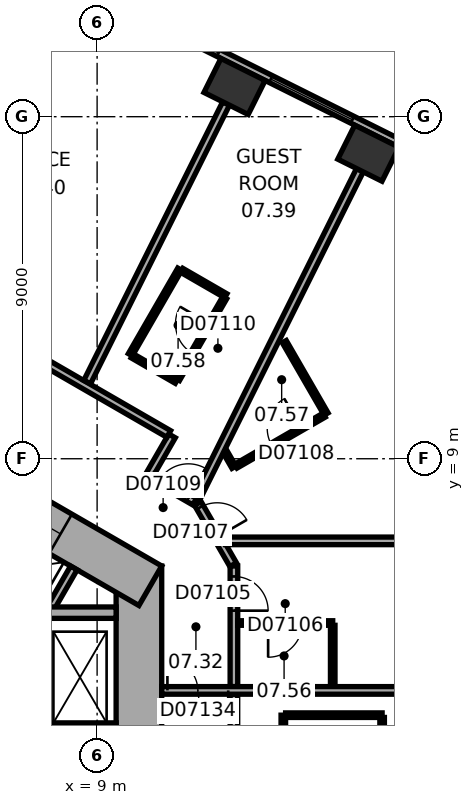
"""IFC4 building model, lengths in metres.
Left out: names, types, materials, properties, quantities, classifications, styles, units other than length and angle.
Written with IfcOpenShell. Run it as: python <this file> out.ifc"""

import sys

from ifc_helpers import new_model, si_unit, direction, frame, frame_2d, origin, origin_2d, place, context, subcontext, project, spatial, rectangle, extrude, element, fill, save


model = new_model("IFC4")
c1 = context("Model", 3, precision=1e-05, world=origin(), true_north=direction((0.0, 1.0)))
c2 = subcontext(c1, "Body", "Model", "MODEL_VIEW")
j1 = project(units=[si_unit("LENGTHUNIT", "METRE"), si_unit("PLANEANGLEUNIT", "RADIAN")], contexts=[c1])
p1 = place(None, origin())
s1 = spatial("IfcSite", under=j1, at=p1, CompositionType="ELEMENT")
p2 = place(p1, origin())
s2 = spatial("IfcBuilding", under=s1, at=p2, CompositionType="ELEMENT")
p3 = place(p2, frame((0.0, 0.0, 44.0)))
s3 = spatial("IfcBuildingStorey", under=s2, at=p3, CompositionType="ELEMENT", Elevation=44.0)
for number, where, z_axis, x_axis in (
    (1, (16.138, 17.04, 0.0), (0.0, 0.0, 1.0), (-0.895, 0.446, 0.0)),
    (2, (12.616, 18.795, 0.0), (0.0, 0.0, 1.0), (-0.895, 0.446, 0.0)),
):
    element("IfcColumn", number, at=place(p3, frame(where, z_axis=z_axis, x_axis=x_axis)), inside=s3, PredefinedType="COLUMN", context=c2, shape_type="SweptSolid", body=[
        extrude(rectangle(XDim=1.3, YDim=1.0, at=origin_2d()), origin(), (0.0, 0.0, 1.0), 3.3),
    ])
p4 = place(p3, frame((10.1, -6.177, 0.0), z_axis=(0.0, 0.0, 1.0), x_axis=(0.0, 1.0, 0.0)))
e3 = element("IfcWall", 3, at=p4, inside=s3, PredefinedType="SHEAR", context=c2, shape_type="SweptSolid", body=[
    extrude(rectangle(XDim=12.355, YDim=1.2, at=frame_2d((6.177, 0.0))), origin(), (0.0, 0.0, 1.0), 3.3),
])
p5 = place(p4, frame((6.378, 0.0, 0.0)))
e4 = element("IfcOpeningElement", 4, at=p5, cuts=e3, PredefinedType="OPENING", context=c2, shape_type="SweptSolid", body=[
    extrude(rectangle(XDim=1.5, YDim=2.1, at=frame_2d((0.75, 1.05))), frame((0.0, 0.61, 0.0), z_axis=(0.0, -1.0, 0.0), x_axis=(1.0, 0.0, 0.0)), (0.0, 0.0, 1.0), 1.22),
])
p6 = place(p4, frame((1.828, 0.0, 0.0)))
e5 = element("IfcOpeningElement", 5, at=p6, cuts=e3, PredefinedType="OPENING", context=c2, shape_type="SweptSolid", body=[
    extrude(rectangle(XDim=1.1, YDim=2.1, at=frame_2d((0.55, 1.05))), frame((0.0, 0.61, 0.0), z_axis=(0.0, -1.0, 0.0), x_axis=(1.0, 0.0, 0.0)), (0.0, 0.0, 1.0), 1.22),
])
p7 = place(p4, frame((4.427, 0.0, 0.0)))
e6 = element("IfcOpeningElement", 6, at=p7, cuts=e3, PredefinedType="OPENING", context=c2, shape_type="SweptSolid", body=[
    extrude(rectangle(XDim=1.1, YDim=2.1, at=frame_2d((0.55, 1.05))), frame((0.0, 0.61, 0.0), z_axis=(0.0, -1.0, 0.0), x_axis=(1.0, 0.0, 0.0)), (0.0, 0.0, 1.0), 1.22),
])
p8 = place(p3, frame((10.4, 5.658, 0.0), z_axis=(0.0, 0.0, 1.0), x_axis=(-0.866021384402, 0.500006961711, 0.0)))
e7 = element("IfcWall", 7, at=p8, inside=s3, PredefinedType="SHEAR", context=c2, shape_type="SweptSolid", body=[
    extrude(rectangle(XDim=12.355, YDim=1.2, at=frame_2d((6.178, 0.0))), origin(), (0.0, 0.0, 1.0), 3.3),
])
p9 = place(p8, frame((2.728, 0.0, 0.0)))
e8 = element("IfcOpeningElement", 8, at=p9, cuts=e7, PredefinedType="OPENING", context=c2, shape_type="SweptSolid", body=[
    extrude(rectangle(XDim=1.1, YDim=2.1, at=frame_2d((0.55, 1.05))), frame((0.0, 0.61, 0.0), z_axis=(0.0, -1.0, 0.0), x_axis=(1.0, 0.0, 0.0)), (0.0, 0.0, 1.0), 1.22),
])
p10 = place(p8, frame((5.328, 0.0, 0.0)))
e9 = element("IfcOpeningElement", 9, at=p10, cuts=e7, PredefinedType="OPENING", context=c2, shape_type="SweptSolid", body=[
    extrude(rectangle(XDim=1.1, YDim=2.1, at=frame_2d((0.55, 1.05))), frame((0.0, 0.61, 0.0), z_axis=(0.0, -1.0, 0.0), x_axis=(1.0, 0.0, 0.0)), (0.0, 0.0, 1.0), 1.22),
])
p11 = place(p8, frame((7.928, 0.0, 0.0)))
e10 = element("IfcOpeningElement", 10, at=p11, cuts=e7, PredefinedType="OPENING", context=c2, shape_type="SweptSolid", body=[
    extrude(rectangle(XDim=1.1, YDim=2.1, at=frame_2d((0.55, 1.05))), frame((0.0, 0.61, 0.0), z_axis=(0.0, -1.0, 0.0), x_axis=(1.0, 0.0, 0.0)), (0.0, 0.0, 1.0), 1.22),
])
p12 = place(p3, frame((20.63, 15.47, 0.0), z_axis=(0.0, 0.0, 1.0), x_axis=(-0.894934518609, 0.446197498203, 0.0)))
e11 = element("IfcWall", 11, at=p12, inside=s3, PredefinedType="STANDARD", context=c2, shape_type="SweptSolid", body=[
    extrude(rectangle(XDim=21.246, YDim=0.2, at=frame_2d((10.623, 0.0))), origin(), (0.0, 0.0, 1.0), 3.3),
])
p13 = place(p12, frame((1.553, 0.0, 0.8)))
e12 = element("IfcOpeningElement", 12, at=p13, cuts=e11, PredefinedType="OPENING", context=c2, shape_type="SweptSolid", body=[
    extrude(rectangle(XDim=2.4, YDim=1.7, at=frame_2d((1.2, 0.85))), frame((0.0, 0.11, 0.0), z_axis=(0.0, -1.0, 0.0), x_axis=(1.0, 0.0, 0.0)), (0.0, 0.0, 1.0), 0.22),
])
p14 = place(p12, frame((5.488, 0.0, 0.8)))
e13 = element("IfcOpeningElement", 13, at=p14, cuts=e11, PredefinedType="OPENING", context=c2, shape_type="SweptSolid", body=[
    extrude(rectangle(XDim=2.4, YDim=1.7, at=frame_2d((1.2, 0.85))), frame((0.0, 0.11, 0.0), z_axis=(0.0, -1.0, 0.0), x_axis=(1.0, 0.0, 0.0)), (0.0, 0.0, 1.0), 0.22),
])
p15 = place(p12, frame((9.422, 0.0, 0.8)))
e14 = element("IfcOpeningElement", 14, at=p15, cuts=e11, PredefinedType="OPENING", context=c2, shape_type="SweptSolid", body=[
    extrude(rectangle(XDim=2.4, YDim=1.7, at=frame_2d((1.2, 0.85))), frame((0.0, 0.11, 0.0), z_axis=(0.0, -1.0, 0.0), x_axis=(1.0, 0.0, 0.0)), (0.0, 0.0, 1.0), 0.22),
])
p16 = place(p12, frame((13.357, 0.0, 0.8)))
e15 = element("IfcOpeningElement", 15, at=p16, cuts=e11, PredefinedType="OPENING", context=c2, shape_type="SweptSolid", body=[
    extrude(rectangle(XDim=2.4, YDim=1.7, at=frame_2d((1.2, 0.85))), frame((0.0, 0.11, 0.0), z_axis=(0.0, -1.0, 0.0), x_axis=(1.0, 0.0, 0.0)), (0.0, 0.0, 1.0), 0.22),
])
p17 = place(p12, frame((17.292, 0.0, 0.8)))
e16 = element("IfcOpeningElement", 16, at=p17, cuts=e11, PredefinedType="OPENING", context=c2, shape_type="SweptSolid", body=[
    extrude(rectangle(XDim=2.4, YDim=1.7, at=frame_2d((1.2, 0.85))), frame((0.0, 0.11, 0.0), z_axis=(0.0, -1.0, 0.0), x_axis=(1.0, 0.0, 0.0)), (0.0, 0.0, 1.0), 0.22),
])
p18 = place(p3, frame((7.287, 4.222, 0.0), z_axis=(0.0, 0.0, 1.0), x_axis=(0.499946605688, 0.86605622881, 0.0)))
e17 = element("IfcWall", 17, at=p18, inside=s3, PredefinedType="PARTITIONING", context=c2, shape_type="SweptSolid", body=[
    extrude(rectangle(XDim=2.2, YDim=0.2, at=frame_2d((1.1, 0.0))), origin(), (0.0, 0.0, 1.0), 3.05),
])
p19 = place(p3, frame((7.3, 1.9, 0.0), z_axis=(0.0, 0.0, 1.0), x_axis=(1.0, 0.0, 0.0)))
e18 = element("IfcWall", 18, at=p19, inside=s3, PredefinedType="SHEAR", context=c2, shape_type="SweptSolid", body=[
    extrude(rectangle(XDim=2.2, YDim=0.3, at=frame_2d((1.1, 0.0))), origin(), (0.0, 0.0, 1.0), 3.05),
])
p20 = place(p19, frame((0.7, 0.0, 0.0)))
e19 = element("IfcOpeningElement", 19, at=p20, cuts=e18, PredefinedType="OPENING", context=c2, shape_type="SweptSolid", body=[
    extrude(rectangle(XDim=1.1, YDim=2.1, at=frame_2d((0.55, 1.05))), frame((0.0, 0.16, 0.0), z_axis=(0.0, -1.0, 0.0), x_axis=(1.0, 0.0, 0.0)), (0.0, 0.0, 1.0), 0.32),
])
p21 = place(p3, frame((7.3, 4.95, 0.0), z_axis=(0.0, 0.0, 1.0), x_axis=(1.0, 0.0, 0.0)))
e20 = element("IfcWall", 20, at=p21, inside=s3, PredefinedType="SHEAR", context=c2, shape_type="SweptSolid", body=[
    extrude(rectangle(XDim=2.2, YDim=0.3, at=frame_2d((1.1, 0.0))), origin(), (0.0, 0.0, 1.0), 3.05),
])
p22 = place(p3, frame((9.875, 11.736, 0.0), z_axis=(0.0, 0.0, 1.0), x_axis=(0.499936506574, 0.866062058628, 0.0)))
e21 = element("IfcWall", 21, at=p22, inside=s3, PredefinedType="PARTITIONING", context=c2, shape_type="SweptSolid", body=[
    extrude(rectangle(XDim=2.6, YDim=0.12, at=frame_2d((1.3, 0.0))), origin(), (0.0, 0.0, 1.0), 3.05),
])
p23 = place(p3, frame((10.371, 8.561, 0.0), z_axis=(0.0, 0.0, 1.0), x_axis=(0.499986357472, 0.866033280158, 0.0)))
e22 = element("IfcWall", 22, at=p23, inside=s3, PredefinedType="PARTITIONING", context=c2, shape_type="SweptSolid", body=[
    extrude(rectangle(XDim=1.201, YDim=0.2, at=frame_2d((0.601, 0.0))), origin(), (0.0, 0.0, 1.0), 3.05),
])
p24 = place(p3, frame((10.885, 9.652, 0.0), z_axis=(0.0, 0.0, 1.0), x_axis=(-0.866033868542, 0.499985338323, 0.0)))
e23 = element("IfcWall", 23, at=p24, inside=s3, PredefinedType="PARTITIONING", context=c2, shape_type="SweptSolid", body=[
    extrude(rectangle(XDim=8.602, YDim=0.2, at=frame_2d((4.301, 0.0))), origin(), (0.0, 0.0, 1.0), 3.05),
])
p25 = place(p24, frame((5.069, 0.0, 0.0)))
e24 = element("IfcOpeningElement", 24, at=p25, cuts=e23, PredefinedType="OPENING", context=c2, shape_type="SweptSolid", body=[
    extrude(rectangle(XDim=1.0, YDim=2.1, at=frame_2d((0.5, 1.05))), frame((0.0, 0.11, 0.0), z_axis=(0.0, -1.0, 0.0), x_axis=(1.0, 0.0, 0.0)), (0.0, 0.0, 1.0), 0.22),
])
for number, where, z_axis, x_axis in (
    (25, (11.087, 11.036, 0.0), (0.0, 0.0, 1.0), (-0.866, 0.5, 0.0)),
    (26, (11.226, 13.958, 0.0), (0.0, 0.0, 1.0), (0.866, -0.5, 0.0)),
):
    element("IfcWall", number, at=place(p3, frame(where, z_axis=z_axis, x_axis=x_axis)), inside=s3, PredefinedType="PARTITIONING", context=c2, shape_type="SweptSolid", body=[
        extrude(rectangle(XDim=1.34, YDim=0.12, at=frame_2d((0.67, 0.0))), origin(), (0.0, 0.0, 1.0), 3.05),
    ])
p26 = place(p3, frame((11.566, 7.871, 0.0), z_axis=(0.0, 0.0, 1.0), x_axis=(-0.866004557827, 0.500036104519, 0.0)))
e27 = element("IfcWall", 27, at=p26, inside=s3, PredefinedType="PARTITIONING", context=c2, shape_type="SweptSolid", body=[
    extrude(rectangle(XDim=1.28, YDim=0.2, at=frame_2d((0.64, 0.0))), origin(), (0.0, 0.0, 1.0), 3.05),
])
p27 = place(p26, frame((0.19, 0.0, 0.0)))
e28 = element("IfcOpeningElement", 28, at=p27, cuts=e27, PredefinedType="OPENING", context=c2, shape_type="SweptSolid", body=[
    extrude(rectangle(XDim=0.9, YDim=2.1, at=frame_2d((0.45, 1.05))), frame((0.0, 0.11, 0.0), z_axis=(0.0, -1.0, 0.0), x_axis=(1.0, 0.0, 0.0)), (0.0, 0.0, 1.0), 0.22),
])
p28 = place(p3, frame((12.357, 13.236, 0.0), z_axis=(0.0, 0.0, 1.0), x_axis=(-0.50000366821, -0.866023285932, 0.0)))
e29 = element("IfcWall", 29, at=p28, inside=s3, PredefinedType="PARTITIONING", context=c2, shape_type="SweptSolid", body=[
    extrude(rectangle(XDim=2.48, YDim=0.12, at=frame_2d((1.24, 0.0))), origin(), (0.0, 0.0, 1.0), 3.05),
])
p29 = place(p28, frame((0.79, 0.0, 0.0)))
e30 = element("IfcOpeningElement", 30, at=p29, cuts=e29, PredefinedType="OPENING", context=c2, shape_type="SweptSolid", body=[
    extrude(rectangle(XDim=0.9, YDim=2.1, at=frame_2d((0.45, 1.05))), frame((0.0, 0.07, 0.0), z_axis=(0.0, -1.0, 0.0), x_axis=(1.0, 0.0, 0.0)), (0.0, 0.0, 1.0), 0.14),
])
p30 = place(p3, frame((12.393, 18.348, 0.0), z_axis=(0.0, 0.0, 1.0), x_axis=(-0.446176022699, -0.894945225569, 0.0)))
e31 = element("IfcWall", 31, at=p30, inside=s3, PredefinedType="PARTITIONING", context=c2, shape_type="SweptSolid", body=[
    extrude(rectangle(XDim=8.191, YDim=0.2, at=frame_2d((4.095, 0.0))), origin(), (0.0, 0.0, 1.0), 2.6),
])
p31 = place(p3, frame((12.58, 6.212, 0.0), z_axis=(0.0, 0.0, 1.0), x_axis=(-0.500063286585, 0.865988862174, 0.0)))
e32 = element("IfcWall", 32, at=p31, inside=s3, PredefinedType="PARTITIONING", context=c2, shape_type="SweptSolid", body=[
    extrude(rectangle(XDim=1.86, YDim=0.2, at=frame_2d((0.93, 0.0))), origin(), (0.0, 0.0, 1.0), 3.05),
])
p32 = place(p31, frame((0.842, 0.0, 0.0)))
e33 = element("IfcOpeningElement", 33, at=p32, cuts=e32, PredefinedType="OPENING", context=c2, shape_type="SweptSolid", body=[
    extrude(rectangle(XDim=0.9, YDim=2.1, at=frame_2d((0.45, 1.05))), frame((0.0, 0.11, 0.0), z_axis=(0.0, -1.0, 0.0), x_axis=(1.0, 0.0, 0.0)), (0.0, 0.0, 1.0), 0.22),
])
p33 = place(p3, frame((12.6, 0.201, 0.0), z_axis=(0.0, 0.0, 1.0), x_axis=(0.0, 1.0, 0.0)))
e34 = element("IfcWall", 34, at=p33, inside=s3, PredefinedType="PARTITIONING", context=c2, shape_type="SweptSolid", body=[
    extrude(rectangle(XDim=2.604, YDim=0.2, at=frame_2d((1.302, 0.0))), origin(), (0.0, 0.0, 1.0), 3.05),
])
p34 = place(p3, frame((12.6, 3.004, 0.0), z_axis=(0.0, 0.0, 1.0), x_axis=(0.0, 1.0, 0.0)))
e35 = element("IfcWall", 35, at=p34, inside=s3, PredefinedType="PARTITIONING", context=c2, shape_type="SweptSolid", body=[
    extrude(rectangle(XDim=3.173, YDim=0.2, at=frame_2d((1.586, 0.0))), origin(), (0.0, 0.0, 1.0), 3.05),
])
p35 = place(p34, frame((1.998, 0.0, 0.0)))
e36 = element("IfcOpeningElement", 36, at=p35, cuts=e35, PredefinedType="OPENING", context=c2, shape_type="SweptSolid", body=[
    extrude(rectangle(XDim=0.9, YDim=2.1, at=frame_2d((0.45, 1.05))), frame((0.0, 0.11, 0.0), z_axis=(0.0, -1.0, 0.0), x_axis=(1.0, 0.0, 0.0)), (0.0, 0.0, 1.0), 0.22),
])
p36 = place(p3, frame((12.601, 8.776, 0.0), z_axis=(0.0, 0.0, 1.0), x_axis=(-0.500166486798, 0.865929261247, 0.0)))
e37 = element("IfcWall", 37, at=p36, inside=s3, PredefinedType="PARTITIONING", context=c2, shape_type="SweptSolid", body=[
    extrude(rectangle(XDim=0.476, YDim=0.12, at=frame_2d((0.238, 0.0))), origin(), (0.0, 0.0, 1.0), 3.05),
])
p37 = place(p3, frame((12.7, 4.677, 0.0), z_axis=(0.0, 0.0, 1.0), x_axis=(1.0, 0.0, 0.0)))
e38 = element("IfcWall", 38, at=p37, inside=s3, PredefinedType="PARTITIONING", context=c2, shape_type="SweptSolid", body=[
    extrude(rectangle(XDim=2.5, YDim=0.12, at=frame_2d((1.25, 0.0))), origin(), (0.0, 0.0, 1.0), 3.05),
])
p38 = place(p37, frame((0.8, 0.0, 0.0)))
e39 = element("IfcOpeningElement", 39, at=p38, cuts=e38, PredefinedType="OPENING", context=c2, shape_type="SweptSolid", body=[
    extrude(rectangle(XDim=0.9, YDim=2.1, at=frame_2d((0.45, 1.05))), frame((0.0, 0.07, 0.0), z_axis=(0.0, -1.0, 0.0), x_axis=(1.0, 0.0, 0.0)), (0.0, 0.0, 1.0), 0.14),
])
p39 = place(p3, frame((13.9, 0.853, 0.0), z_axis=(0.0, 0.0, 1.0), x_axis=(0.0, 1.0, 0.0)))
e40 = element("IfcWall", 40, at=p39, inside=s3, PredefinedType="PARTITIONING", context=c2, shape_type="SweptSolid", body=[
    extrude(rectangle(XDim=1.4, YDim=0.12, at=frame_2d((0.7, 0.0))), origin(), (0.0, 0.0, 1.0), 3.05),
])
p40 = place(p3, frame((13.926, 12.081, 0.0), z_axis=(0.0, 0.0, 1.0), x_axis=(0.499994660107, -0.866028486751, 0.0)))
e41 = element("IfcWall", 41, at=p40, inside=s3, PredefinedType="PARTITIONING", context=c2, shape_type="SweptSolid", body=[
    extrude(rectangle(XDim=2.2, YDim=0.12, at=frame_2d((1.1, 0.0))), origin(), (0.0, 0.0, 1.0), 3.05),
])
p41 = place(p3, frame((13.96, 2.253, 0.0), z_axis=(0.0, 0.0, 1.0), x_axis=(1.0, 0.0, 0.0)))
e42 = element("IfcWall", 42, at=p41, inside=s3, PredefinedType="PARTITIONING", context=c2, shape_type="SweptSolid", body=[
    extrude(rectangle(XDim=2.54, YDim=0.12, at=frame_2d((1.27, 0.0))), origin(), (0.0, 0.0, 1.0), 3.05),
])
p42 = place(p3, frame((14.974, 10.146, 0.0), z_axis=(0.0, 0.0, 1.0), x_axis=(-0.86599746015, -0.500048396672, 0.0)))
e43 = element("IfcWall", 43, at=p42, inside=s3, PredefinedType="PARTITIONING", context=c2, shape_type="SweptSolid", body=[
    extrude(rectangle(XDim=2.68, YDim=0.12, at=frame_2d((1.34, 0.0))), origin(), (0.0, 0.0, 1.0), 3.05),
])
p43 = place(p42, frame((0.69, 0.0, 0.0)))
e44 = element("IfcOpeningElement", 44, at=p43, cuts=e43, PredefinedType="OPENING", context=c2, shape_type="SweptSolid", body=[
    extrude(rectangle(XDim=0.9, YDim=2.1, at=frame_2d((0.45, 1.05))), frame((0.0, 0.07, 0.0), z_axis=(0.0, -1.0, 0.0), x_axis=(1.0, 0.0, 0.0)), (0.0, 0.0, 1.0), 0.14),
])
p44 = place(p3, frame((15.2, 4.618, 0.0), z_axis=(0.0, 0.0, 1.0), x_axis=(0.0, -1.0, 0.0)))
e45 = element("IfcWall", 45, at=p44, inside=s3, PredefinedType="PARTITIONING", context=c2, shape_type="SweptSolid", body=[
    extrude(rectangle(XDim=1.613, YDim=0.12, at=frame_2d((0.807, 0.0))), origin(), (0.0, 0.0, 1.0), 3.05),
])
p45 = place(p3, frame((15.915, 16.592, 0.0), z_axis=(0.0, 0.0, 1.0), x_axis=(-0.446199736347, -0.894933402709, 0.0)))
e46 = element("IfcWall", 46, at=p45, inside=s3, PredefinedType="PARTITIONING", context=c2, shape_type="SweptSolid", body=[
    extrude(rectangle(XDim=9.635, YDim=0.2, at=frame_2d((4.817, 0.0))), origin(), (0.0, 0.0, 1.0), 3.05),
])
p46 = place(p3, frame((16.5, 2.193, 0.0), z_axis=(0.0, 0.0, 1.0), x_axis=(0.0, -1.0, 0.0)))
e47 = element("IfcWall", 47, at=p46, inside=s3, PredefinedType="PARTITIONING", context=c2, shape_type="SweptSolid", body=[
    extrude(rectangle(XDim=1.28, YDim=0.12, at=frame_2d((0.64, 0.0))), origin(), (0.0, 0.0, 1.0), 3.05),
])
p47 = place(p3, frame((21.95, 2.905, 0.0), z_axis=(0.0, 0.0, 1.0), x_axis=(-1.0, 0.0, 0.0)))
e48 = element("IfcWall", 48, at=p47, inside=s3, PredefinedType="PARTITIONING", context=c2, shape_type="SweptSolid", body=[
    extrude(rectangle(XDim=11.25, YDim=0.2, at=frame_2d((5.625, 0.0))), origin(), (0.0, 0.0, 1.0), 3.05),
])
p48 = place(p47, frame((9.5, 0.0, 0.0)))
e49 = element("IfcOpeningElement", 49, at=p48, cuts=e48, PredefinedType="OPENING", context=c2, shape_type="SweptSolid", body=[
    extrude(rectangle(XDim=1.6, YDim=2.1, at=frame_2d((0.8, 1.05))), frame((0.0, 0.11, 0.0), z_axis=(0.0, -1.0, 0.0), x_axis=(1.0, 0.0, 0.0)), (0.0, 0.0, 1.0), 0.22),
])
p49 = place(p3, frame((21.95, 6.839, 0.0), z_axis=(0.0, 0.0, 1.0), x_axis=(-1.0, 0.0, 0.0)))
e50 = element("IfcWall", 50, at=p49, inside=s3, PredefinedType="PARTITIONING", context=c2, shape_type="SweptSolid", body=[
    extrude(rectangle(XDim=9.572, YDim=0.2, at=frame_2d((4.786, 0.0))), origin(), (0.0, 0.0, 1.0), 3.05),
])
p50 = place(p14, origin())
e51 = element("IfcWindow", 51, at=p50, inside=s3, PartitioningType="SINGLE_PANEL", PredefinedType="WINDOW", context=c2, shape_type="SweptSolid", body=[
    extrude(rectangle(XDim=2.4, YDim=1.7, at=frame_2d((1.2, 0.85))), frame((0.0, 0.03, 0.0), z_axis=(0.0, -1.0, 0.0), x_axis=(1.0, 0.0, 0.0)), (0.0, 0.0, 1.0), 0.06),
])
fill(e13, e51)
p51 = place(p15, origin())
e52 = element("IfcWindow", 52, at=p51, inside=s3, PartitioningType="SINGLE_PANEL", PredefinedType="WINDOW", context=c2, shape_type="SweptSolid", body=[
    extrude(rectangle(XDim=2.4, YDim=1.7, at=frame_2d((1.2, 0.85))), frame((0.0, 0.03, 0.0), z_axis=(0.0, -1.0, 0.0), x_axis=(1.0, 0.0, 0.0)), (0.0, 0.0, 1.0), 0.06),
])
fill(e14, e52)
p52 = place(p9, origin())
e53 = element("IfcDoor", 53, at=p52, inside=s3, OperationType="DOUBLE_DOOR_SLIDING", PredefinedType="DOOR", context=c2, shape_type="SweptSolid", body=[
    extrude(rectangle(XDim=1.1, YDim=2.1, at=frame_2d((0.55, 1.05))), frame((0.0, 0.025, 0.0), z_axis=(0.0, -1.0, 0.0), x_axis=(1.0, 0.0, 0.0)), (0.0, 0.0, 1.0), 0.05),
])
fill(e8, e53)
p53 = place(p35, origin())
e54 = element("IfcDoor", 54, at=p53, inside=s3, OperationType="SINGLE_SWING_LEFT", PredefinedType="DOOR", context=c2, shape_type="SweptSolid", body=[
    extrude(rectangle(XDim=0.9, YDim=2.1, at=frame_2d((0.45, 1.05))), frame((0.0, 0.025, 0.0), z_axis=(0.0, -1.0, 0.0), x_axis=(1.0, 0.0, 0.0)), (0.0, 0.0, 1.0), 0.05),
])
fill(e36, e54)
p54 = place(p38, origin())
e55 = element("IfcDoor", 55, at=p54, inside=s3, OperationType="SINGLE_SWING_LEFT", PredefinedType="DOOR", context=c2, shape_type="SweptSolid", body=[
    extrude(rectangle(XDim=0.9, YDim=2.1, at=frame_2d((0.45, 1.05))), frame((0.0, 0.025, 0.0), z_axis=(0.0, -1.0, 0.0), x_axis=(1.0, 0.0, 0.0)), (0.0, 0.0, 1.0), 0.05),
])
fill(e39, e55)
p55 = place(p32, origin())
e56 = element("IfcDoor", 56, at=p55, inside=s3, OperationType="SINGLE_SWING_LEFT", PredefinedType="DOOR", context=c2, shape_type="SweptSolid", body=[
    extrude(rectangle(XDim=0.9, YDim=2.1, at=frame_2d((0.45, 1.05))), frame((0.0, 0.025, 0.0), z_axis=(0.0, -1.0, 0.0), x_axis=(1.0, 0.0, 0.0)), (0.0, 0.0, 1.0), 0.05),
])
fill(e33, e56)
p56 = place(p43, origin())
e57 = element("IfcDoor", 57, at=p56, inside=s3, OperationType="SINGLE_SWING_LEFT", PredefinedType="DOOR", context=c2, shape_type="SweptSolid", body=[
    extrude(rectangle(XDim=0.9, YDim=2.1, at=frame_2d((0.45, 1.05))), frame((0.0, 0.025, 0.0), z_axis=(0.0, -1.0, 0.0), x_axis=(1.0, 0.0, 0.0)), (0.0, 0.0, 1.0), 0.05),
])
fill(e44, e57)
p57 = place(p27, origin())
e58 = element("IfcDoor", 58, at=p57, inside=s3, OperationType="SINGLE_SWING_LEFT", PredefinedType="DOOR", context=c2, shape_type="SweptSolid", body=[
    extrude(rectangle(XDim=0.9, YDim=2.1, at=frame_2d((0.45, 1.05))), frame((0.0, 0.025, 0.0), z_axis=(0.0, -1.0, 0.0), x_axis=(1.0, 0.0, 0.0)), (0.0, 0.0, 1.0), 0.05),
])
fill(e28, e58)
p58 = place(p29, origin())
e59 = element("IfcDoor", 59, at=p58, inside=s3, OperationType="SINGLE_SWING_LEFT", PredefinedType="DOOR", context=c2, shape_type="SweptSolid", body=[
    extrude(rectangle(XDim=0.9, YDim=2.1, at=frame_2d((0.45, 1.05))), frame((0.0, 0.025, 0.0), z_axis=(0.0, -1.0, 0.0), x_axis=(1.0, 0.0, 0.0)), (0.0, 0.0, 1.0), 0.05),
])
fill(e30, e59)
p59 = place(p48, origin())
e60 = element("IfcDoor", 60, at=p59, inside=s3, OperationType="DOUBLE_DOOR_SINGLE_SWING", PredefinedType="DOOR", context=c2, shape_type="SweptSolid", body=[
    extrude(rectangle(XDim=1.6, YDim=2.1, at=frame_2d((0.8, 1.05))), frame((0.0, 0.025, 0.0), z_axis=(0.0, -1.0, 0.0), x_axis=(1.0, 0.0, 0.0)), (0.0, 0.0, 1.0), 0.05),
])
fill(e49, e60)
save(model, sys.argv[1])
